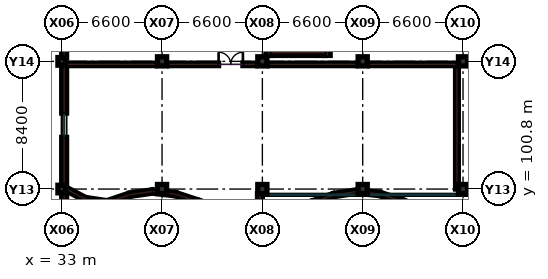
"""IFC4 building model, lengths in metres.
Left out: names, types, materials, properties, quantities, classifications, styles, units other than length and angle.
Written with IfcOpenShell. Run it as: python <this file> out.ifc"""

import sys

from ifc_helpers import new_model, si_unit, direction, frame, frame_2d, origin, origin_2d, place, context, subcontext, project, spatial, rectangle, extrude, element, fill, save


model = new_model("IFC4")
c1 = context("Model", 3, precision=1e-05, world=origin(), true_north=direction((0.0, 1.0)))
c2 = subcontext(c1, "Body", "Model", "MODEL_VIEW")
j1 = project(units=[si_unit("LENGTHUNIT", "METRE"), si_unit("PLANEANGLEUNIT", "RADIAN")], contexts=[c1])
p1 = place(None, origin())
s1 = spatial("IfcSite", under=j1, at=p1, CompositionType="ELEMENT")
p2 = place(p1, origin())
s2 = spatial("IfcBuilding", under=s1, at=p2, CompositionType="ELEMENT")
p3 = place(p2, frame((0.0, 0.0, 9.9)))
s3 = spatial("IfcBuildingStorey", under=s2, at=p3, CompositionType="ELEMENT", Elevation=9.9)
for number, where, z_axis, x_axis in (
    (1, (33.0, 100.8, 0.0), (0.0, 0.0, 1.0), (1.0, 0.0, 0.0)),
    (2, (33.0, 109.2, 0.0), (0.0, 0.0, 1.0), (1.0, 0.0, 0.0)),
):
    element("IfcColumn", number, at=place(p3, frame(where, z_axis=z_axis, x_axis=x_axis)), inside=s3, PredefinedType="COLUMN", context=c2, shape_type="SweptSolid", body=[
        extrude(rectangle(XDim=0.5, YDim=0.5, at=origin_2d()), origin(), (0.0, 0.0, 1.0), 4.5),
    ])
for number, where, z_axis, x_axis in (
    (3, (39.6, 100.8, 0.0), (0.0, 0.0, 1.0), (1.0, 0.0, 0.0)),
    (4, (39.6, 109.2, 0.0), (0.0, 0.0, 1.0), (1.0, 0.0, 0.0)),
    (5, (46.2, 100.8, 0.0), (0.0, 0.0, 1.0), (1.0, 0.0, 0.0)),
    (6, (46.2, 109.2, 0.0), (0.0, 0.0, 1.0), (1.0, 0.0, 0.0)),
    (7, (52.8, 100.8, 0.0), (0.0, 0.0, 1.0), (1.0, 0.0, 0.0)),
    (8, (52.8, 109.2, 0.0), (0.0, 0.0, 1.0), (1.0, 0.0, 0.0)),
    (9, (59.4, 100.8, 0.0), (0.0, 0.0, 1.0), (1.0, 0.0, 0.0)),
    (10, (59.4, 109.2, 0.0), (0.0, 0.0, 1.0), (1.0, 0.0, 0.0)),
):
    element("IfcColumn", number, at=place(p3, frame(where, z_axis=z_axis, x_axis=x_axis)), inside=s3, PredefinedType="COLUMN", context=c2, shape_type="SweptSolid", body=[
        extrude(rectangle(XDim=0.6, YDim=0.6, at=origin_2d()), origin(), (0.0, 0.0, 1.0), 4.5),
    ])
p4 = place(p3, frame((33.32, 109.0, 0.0), z_axis=(0.0, 0.0, 1.0), x_axis=(1.0, 0.0, 0.0)))
e11 = element("IfcWall", 11, at=p4, inside=s3, PredefinedType="PARTITIONING", context=c2, shape_type="SweptSolid", body=[
    extrude(rectangle(XDim=5.83, YDim=0.16, at=frame_2d((2.915, 0.0))), origin(), (0.0, 0.0, 1.0), 3.475),
])
p5 = place(p3, frame((40.05, 109.0, 0.0), z_axis=(0.0, 0.0, 1.0), x_axis=(1.0, 0.0, 0.0)))
e12 = element("IfcWall", 12, at=p5, inside=s3, PredefinedType="PARTITIONING", context=c2, shape_type="SweptSolid", body=[
    extrude(rectangle(XDim=5.7, YDim=0.16, at=frame_2d((2.85, 0.0))), origin(), (0.0, 0.0, 1.0), 3.475),
])
p6 = place(p5, frame((3.27, 0.0, 0.0)))
e13 = element("IfcOpeningElement", 13, at=p6, cuts=e12, PredefinedType="OPENING", context=c2, shape_type="SweptSolid", body=[
    extrude(rectangle(XDim=1.6, YDim=2.2, at=frame_2d((0.8, 1.1))), frame((0.0, 0.09, 0.0), z_axis=(0.0, -1.0, 0.0), x_axis=(1.0, 0.0, 0.0)), (0.0, 0.0, 1.0), 0.18),
])
p7 = place(p3, frame((46.65, 109.0, 0.0), z_axis=(0.0, 0.0, 1.0), x_axis=(1.0, 0.0, 0.0)))
e14 = element("IfcWall", 14, at=p7, inside=s3, PredefinedType="PARTITIONING", context=c2, shape_type="SweptSolid", body=[
    extrude(rectangle(XDim=5.7, YDim=0.16, at=frame_2d((2.85, 0.0))), origin(), (0.0, 0.0, 1.0), 3.475),
])
p8 = place(p3, frame((53.25, 109.0, 0.0), z_axis=(0.0, 0.0, 1.0), x_axis=(1.0, 0.0, 0.0)))
e15 = element("IfcWall", 15, at=p8, inside=s3, PredefinedType="PARTITIONING", context=c2, shape_type="SweptSolid", body=[
    extrude(rectangle(XDim=5.7, YDim=0.16, at=frame_2d((2.85, 0.0))), origin(), (0.0, 0.0, 1.0), 3.475),
])
p9 = place(p3, frame((59.0, 100.8, 0.0), z_axis=(0.0, 0.0, 1.0), x_axis=(0.0, 1.0, 0.0)))
e16 = element("IfcWall", 16, at=p9, inside=s3, PredefinedType="SOLIDWALL", context=c2, shape_type="SweptSolid", body=[
    extrude(rectangle(XDim=8.2, YDim=0.18, at=frame_2d((4.1, 0.0))), origin(), (0.0, 0.0, 1.0), 3.49),
])
p10 = place(p3, frame((33.16, 100.555, 0.0), z_axis=(0.0, 0.0, 1.0), x_axis=(0.0, -1.0, 0.0)))
e17 = element("IfcWall", 17, at=p10, inside=s3, PredefinedType="SOLIDWALL", context=c2, shape_type="SweptSolid", body=[
    extrude(rectangle(XDim=7.91, YDim=0.32, at=frame_2d((3.955, 0.0))), origin(), (0.0, 0.0, 1.0), 3.625),
])
p11 = place(p10, frame((3.305, 0.0, 0.95)))
e18 = element("IfcOpeningElement", 18, at=p11, cuts=e17, PredefinedType="OPENING", context=c2, shape_type="SweptSolid", body=[
    extrude(rectangle(XDim=1.3, YDim=1.75, at=frame_2d((0.65, 0.875))), frame((0.0, 0.17, 0.0), z_axis=(0.0, -1.0, 0.0), x_axis=(1.0, 0.0, 0.0)), (0.0, 0.0, 1.0), 0.34),
])
p12 = place(p3, frame((33.16, 108.955, 0.0), z_axis=(0.0, 0.0, 1.0), x_axis=(0.0, -1.0, 0.0)))
e19 = element("IfcWall", 19, at=p12, inside=s3, PredefinedType="SOLIDWALL", context=c2, shape_type="SweptSolid", body=[
    extrude(rectangle(XDim=7.91, YDim=0.32, at=frame_2d((3.955, 0.0))), origin(), (0.0, 0.0, 1.0), 3.625),
])
p13 = place(p12, frame((3.155, 0.0, 0.95)))
e20 = element("IfcOpeningElement", 20, at=p13, cuts=e19, PredefinedType="OPENING", context=c2, shape_type="SweptSolid", body=[
    extrude(rectangle(XDim=1.6, YDim=1.85, at=frame_2d((0.8, 0.925))), frame((0.0, 0.17, 0.0), z_axis=(0.0, -1.0, 0.0), x_axis=(1.0, 0.0, 0.0)), (0.0, 0.0, 1.0), 0.34),
])
p14 = place(p3, frame((33.16, 117.355, 0.0), z_axis=(0.0, 0.0, 1.0), x_axis=(0.0, -1.0, 0.0)))
e21 = element("IfcWall", 21, at=p14, inside=s3, PredefinedType="SOLIDWALL", context=c2, shape_type="SweptSolid", body=[
    extrude(rectangle(XDim=7.91, YDim=0.32, at=frame_2d((3.955, 0.0))), origin(), (0.0, 0.0, 1.0), 3.625),
])
p15 = place(p14, frame((3.005, 0.0, 0.95)))
e22 = element("IfcOpeningElement", 22, at=p15, cuts=e21, PredefinedType="OPENING", context=c2, shape_type="SweptSolid", body=[
    extrude(rectangle(XDim=1.9, YDim=1.85, at=frame_2d((0.95, 0.925))), frame((0.0, 0.17, 0.0), z_axis=(0.0, -1.0, 0.0), x_axis=(1.0, 0.0, 0.0)), (0.0, 0.0, 1.0), 0.34),
])
p16 = place(p3, frame((46.04, 92.645, 0.0), z_axis=(0.0, 0.0, 1.0), x_axis=(0.0, 1.0, 0.0)))
e23 = element("IfcWall", 23, at=p16, inside=s3, PredefinedType="SOLIDWALL", context=c2, shape_type="SweptSolid", body=[
    extrude(rectangle(XDim=7.86, YDim=0.32, at=frame_2d((3.93, 0.0))), origin(), (0.0, 0.0, 1.0), 3.625),
])
p17 = place(p16, frame((3.28, 0.0, 0.95)))
e24 = element("IfcOpeningElement", 24, at=p17, cuts=e23, PredefinedType="OPENING", context=c2, shape_type="SweptSolid", body=[
    extrude(rectangle(XDim=1.3, YDim=1.75, at=frame_2d((0.65, 0.875))), frame((0.0, 0.17, 0.0), z_axis=(0.0, -1.0, 0.0), x_axis=(1.0, 0.0, 0.0)), (0.0, 0.0, 1.0), 0.34),
])
p18 = place(p3, frame((33.065, 100.925, 0.0), z_axis=(0.0, 0.0, 1.0), x_axis=(0.882899095401, -0.469562761875, 0.0)))
e25 = element("IfcWall", 25, at=p18, inside=s3, PredefinedType="SOLIDWALL", context=c2, shape_type="SweptSolid", body=[
    extrude(rectangle(XDim=1.693, YDim=0.22, at=frame_2d((0.847, 0.0))), origin(), (0.0, 0.0, 1.0), 1.45),
])
p19 = place(p3, frame((34.515, 100.145, 0.0), z_axis=(0.0, 0.0, 1.0), x_axis=(0.988855668417, -0.148877355696, 0.0)))
e26 = element("IfcWall", 26, at=p19, inside=s3, PredefinedType="SOLIDWALL", context=c2, shape_type="SweptSolid", body=[
    extrude(rectangle(XDim=1.512, YDim=0.22, at=frame_2d((0.756, 0.0))), origin(), (0.0, 0.0, 1.0), 1.45),
])
p20 = place(p3, frame((35.945, 99.915, 0.0), z_axis=(0.0, 0.0, 1.0), x_axis=(0.947422519731, 0.319985263891, 0.0)))
e27 = element("IfcWall", 27, at=p20, inside=s3, PredefinedType="SOLIDWALL", context=c2, shape_type="SweptSolid", body=[
    extrude(rectangle(XDim=1.578, YDim=0.22, at=frame_2d((0.789, 0.0))), origin(), (0.0, 0.0, 1.0), 1.45),
])
p21 = place(p3, frame((37.465, 100.425, 0.0), z_axis=(0.0, 0.0, 1.0), x_axis=(0.989763766402, 0.142715404626, 0.0)))
e28 = element("IfcWall", 28, at=p21, inside=s3, PredefinedType="SOLIDWALL", context=c2, shape_type="SweptSolid", body=[
    extrude(rectangle(XDim=1.505, YDim=0.22, at=frame_2d((0.753, 0.0))), origin(), (0.0, 0.0, 1.0), 1.45),
])
p22 = place(p3, frame((38.99, 100.64, 0.0), z_axis=(0.0, 0.0, 1.0), x_axis=(0.992836122278, -0.119484033658, 0.0)))
e29 = element("IfcWall", 29, at=p22, inside=s3, PredefinedType="SOLIDWALL", context=c2, shape_type="SweptSolid", body=[
    extrude(rectangle(XDim=1.506, YDim=0.22, at=frame_2d((0.753, 0.0))), origin(), (0.0, 0.0, 1.0), 1.45),
])
p23 = place(p3, frame((40.515, 100.455, 0.0), z_axis=(0.0, 0.0, 1.0), x_axis=(0.949301527617, -0.314366998368, 0.0)))
e30 = element("IfcWall", 30, at=p23, inside=s3, PredefinedType="SOLIDWALL", context=c2, shape_type="SweptSolid", body=[
    extrude(rectangle(XDim=1.575, YDim=0.22, at=frame_2d((0.788, 0.0))), origin(), (0.0, 0.0, 1.0), 1.45),
])
p24 = place(p3, frame((49.395, 99.885, 0.0), z_axis=(0.0, 0.0, 1.0), x_axis=(0.945157178061, 0.326615842787, 0.0)))
e31 = element("IfcWall", 31, at=p24, inside=s3, PredefinedType="SOLIDWALL", context=c2, shape_type="SweptSolid", body=[
    extrude(rectangle(XDim=1.576, YDim=0.22, at=frame_2d((0.788, 0.0))), origin(), (0.0, 0.0, 1.0), 1.45),
])
p25 = place(p3, frame((50.91, 100.41, 0.0), z_axis=(0.0, 0.0, 1.0), x_axis=(0.988375429001, 0.152032928498, 0.0)))
e32 = element("IfcWall", 32, at=p25, inside=s3, PredefinedType="SOLIDWALL", context=c2, shape_type="SweptSolid", body=[
    extrude(rectangle(XDim=1.513, YDim=0.22, at=frame_2d((0.756, 0.0))), origin(), (0.0, 0.0, 1.0), 1.45),
])
p26 = place(p3, frame((52.44, 100.64, 0.0), z_axis=(0.0, 0.0, 1.0), x_axis=(0.993603599941, -0.112924249765, 0.0)))
e33 = element("IfcWall", 33, at=p26, inside=s3, PredefinedType="SOLIDWALL", context=c2, shape_type="SweptSolid", body=[
    extrude(rectangle(XDim=1.505, YDim=0.22, at=frame_2d((0.752, 0.0))), origin(), (0.0, 0.0, 1.0), 1.45),
])
p27 = place(p3, frame((53.965, 100.465, 0.0), z_axis=(0.0, 0.0, 1.0), x_axis=(0.951169825822, -0.308668045714, 0.0)))
e34 = element("IfcWall", 34, at=p27, inside=s3, PredefinedType="SOLIDWALL", context=c2, shape_type="SweptSolid", body=[
    extrude(rectangle(XDim=1.572, YDim=0.22, at=frame_2d((0.786, 0.0))), origin(), (0.0, 0.0, 1.0), 1.45),
])
p28 = place(p3, frame((46.62, 109.59, 0.0), z_axis=(0.0, 0.0, 1.0), x_axis=(0.0, 1.0, 0.0)))
e35 = element("IfcWall", 35, at=p28, inside=s3, PredefinedType="SHEAR", context=c2, shape_type="SweptSolid", body=[
    extrude(rectangle(XDim=7.84, YDim=0.36, at=frame_2d((3.92, 0.0))), origin(), (0.0, 0.0, 1.0), 4.24),
])
p29 = place(p3, frame((50.48, 109.59, 0.0), z_axis=(0.0, 0.0, 1.0), x_axis=(0.0, 1.0, 0.0)))
e36 = element("IfcWall", 36, at=p29, inside=s3, PredefinedType="SHEAR", context=c2, shape_type="SweptSolid", body=[
    extrude(rectangle(XDim=7.84, YDim=0.36, at=frame_2d((3.92, 0.0))), origin(), (0.0, 0.0, 1.0), 4.24),
])
p30 = place(p29, frame((0.45, 0.0, 0.0)))
e37 = element("IfcOpeningElement", 37, at=p30, cuts=e36, PredefinedType="OPENING", context=c2, shape_type="SweptSolid", body=[
    extrude(rectangle(XDim=1.25, YDim=2.15, at=frame_2d((0.625, 1.075))), frame((0.0, 0.19, 0.0), z_axis=(0.0, -1.0, 0.0), x_axis=(1.0, 0.0, 0.0)), (0.0, 0.0, 1.0), 0.38),
])
p31 = place(p3, frame((46.8, 109.77, 0.0), z_axis=(0.0, 0.0, 1.0), x_axis=(1.0, 0.0, 0.0)))
e38 = element("IfcWall", 38, at=p31, inside=s3, PredefinedType="SHEAR", context=c2, shape_type="SweptSolid", body=[
    extrude(rectangle(XDim=3.5, YDim=0.36, at=frame_2d((1.75, 0.0))), origin(), (0.0, 0.0, 1.0), 4.24),
])
p32 = place(p6, origin())
e39 = element("IfcDoor", 39, at=p32, inside=s3, OperationType="DOUBLE_DOOR_SINGLE_SWING", PredefinedType="DOOR", context=c2, shape_type="SweptSolid", body=[
    extrude(rectangle(XDim=1.6, YDim=2.2, at=frame_2d((0.8, 1.1))), frame((0.0, 0.025, 0.0), z_axis=(0.0, -1.0, 0.0), x_axis=(1.0, 0.0, 0.0)), (0.0, 0.0, 1.0), 0.05),
])
fill(e13, e39)
p33 = place(p13, origin())
e40 = element("IfcWindow", 40, at=p33, inside=s3, PartitioningType="SINGLE_PANEL", PredefinedType="WINDOW", context=c2, shape_type="SweptSolid", body=[
    extrude(rectangle(XDim=1.6, YDim=1.85, at=frame_2d((0.8, 0.925))), frame((0.0, 0.03, 0.0), z_axis=(0.0, -1.0, 0.0), x_axis=(1.0, 0.0, 0.0)), (0.0, 0.0, 1.0), 0.06),
])
fill(e20, e40)
save(model, sys.argv[1])
